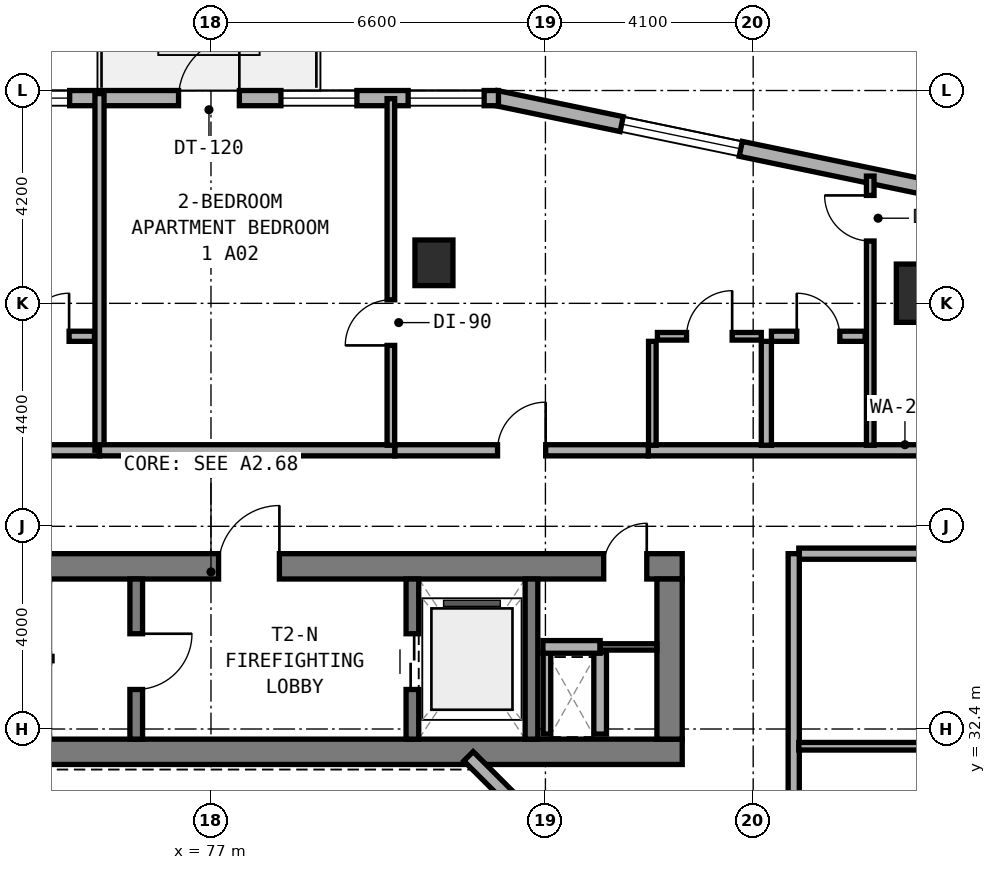
"""IFC4 building model, lengths in metres.
Left out: names, types, materials, properties, quantities, classifications, styles, units other than length and angle.
Written with IfcOpenShell. Run it as: python <this file> out.ifc"""

import sys

from ifc_helpers import new_model, si_unit, direction, frame, frame_2d, origin, origin_2d, place, context, subcontext, project, spatial, rectangle, extrude, element, fill, save


model = new_model("IFC4")
c1 = context("Model", 3, precision=1e-05, world=origin(), true_north=direction((0.0, 1.0)))
c2 = subcontext(c1, "Body", "Model", "MODEL_VIEW")
j1 = project(units=[si_unit("LENGTHUNIT", "METRE"), si_unit("PLANEANGLEUNIT", "RADIAN")], contexts=[c1])
p1 = place(None, origin())
s1 = spatial("IfcSite", under=j1, at=p1, CompositionType="ELEMENT")
p2 = place(p1, origin())
s2 = spatial("IfcBuilding", under=s1, at=p2, CompositionType="ELEMENT")
p3 = place(p2, frame((0.0, 0.0, 59.0)))
s3 = spatial("IfcBuildingStorey", under=s2, at=p3, CompositionType="ELEMENT", Elevation=59.0)
p4 = place(p3, frame((67.9, 31.95, 0.0), z_axis=(0.0, 0.0, 1.0), x_axis=(1.0, 0.0, 0.0)))
e1 = element("IfcWall", 1, at=p4, inside=s3, PredefinedType="SHEAR", context=c2, shape_type="SweptSolid", body=[
    extrude(rectangle(XDim=18.4, YDim=0.5, at=frame_2d((9.2, 0.0))), origin(), (0.0, 0.0, 1.0), 3.5),
])
p5 = place(p3, frame((67.9, 35.61, 0.0), z_axis=(0.0, 0.0, 1.0), x_axis=(1.0, 0.0, 0.0)))
e2 = element("IfcWall", 2, at=p5, inside=s3, PredefinedType="SHEAR", context=c2, shape_type="SweptSolid", body=[
    extrude(rectangle(XDim=18.4, YDim=0.5, at=frame_2d((9.2, 0.0))), origin(), (0.0, 0.0, 1.0), 3.5),
])
p6 = place(p5, frame((9.25, 0.0, 0.0)))
e3 = element("IfcOpeningElement", 3, at=p6, cuts=e2, PredefinedType="OPENING", context=c2, shape_type="SweptSolid", body=[
    extrude(rectangle(XDim=1.2, YDim=2.15, at=frame_2d((0.6, 1.075))), frame((0.0, 0.26, 0.0), z_axis=(0.0, -1.0, 0.0), x_axis=(1.0, 0.0, 0.0)), (0.0, 0.0, 1.0), 0.52),
])
p7 = place(p5, frame((16.85, 0.0, 0.0)))
e4 = element("IfcOpeningElement", 4, at=p7, cuts=e2, PredefinedType="OPENING", context=c2, shape_type="SweptSolid", body=[
    extrude(rectangle(XDim=0.85, YDim=2.1, at=frame_2d((0.425, 1.05))), frame((0.0, 0.26, 0.0), z_axis=(0.0, -1.0, 0.0), x_axis=(1.0, 0.0, 0.0)), (0.0, 0.0, 1.0), 0.52),
])
p8 = place(p3, frame((86.05, 32.2, 0.0), z_axis=(0.0, 0.0, 1.0), x_axis=(0.0, 1.0, 0.0)))
e5 = element("IfcWall", 5, at=p8, inside=s3, PredefinedType="SHEAR", context=c2, shape_type="SweptSolid", body=[
    extrude(rectangle(XDim=3.16, YDim=0.5, at=frame_2d((1.58, 0.0))), origin(), (0.0, 0.0, 1.0), 3.5),
])
p9 = place(p3, frame((75.525, 32.2, 0.0), z_axis=(0.0, 0.0, 1.0), x_axis=(0.0, 1.0, 0.0)))
e6 = element("IfcWall", 6, at=p9, inside=s3, PredefinedType="STANDARD", context=c2, shape_type="SweptSolid", body=[
    extrude(rectangle(XDim=3.16, YDim=0.25, at=frame_2d((1.58, 0.0))), origin(), (0.0, 0.0, 1.0), 3.25),
])
p10 = place(p9, frame((0.98, 0.0, 0.0)))
e7 = element("IfcOpeningElement", 7, at=p10, cuts=e6, PredefinedType="OPENING", context=c2, shape_type="SweptSolid", body=[
    extrude(rectangle(XDim=1.1, YDim=2.15, at=frame_2d((0.55, 1.075))), frame((0.0, 0.135, 0.0), z_axis=(0.0, -1.0, 0.0), x_axis=(1.0, 0.0, 0.0)), (0.0, 0.0, 1.0), 0.27),
])
p11 = place(p3, frame((80.975, 32.2, 0.0), z_axis=(0.0, 0.0, 1.0), x_axis=(0.0, 1.0, 0.0)))
e8 = element("IfcWall", 8, at=p11, inside=s3, PredefinedType="STANDARD", context=c2, shape_type="SweptSolid", body=[
    extrude(rectangle(XDim=3.16, YDim=0.25, at=frame_2d((1.58, 0.0))), origin(), (0.0, 0.0, 1.0), 3.25),
])
p12 = place(p11, frame((0.98, 0.0, 0.0)))
e9 = element("IfcOpeningElement", 9, at=p12, cuts=e8, PredefinedType="OPENING", context=c2, shape_type="SweptSolid", body=[
    extrude(rectangle(XDim=1.1, YDim=2.15, at=frame_2d((0.55, 1.075))), frame((0.0, 0.135, 0.0), z_axis=(0.0, -1.0, 0.0), x_axis=(1.0, 0.0, 0.0)), (0.0, 0.0, 1.0), 0.27),
])
p13 = place(p3, frame((83.325, 32.2, 0.0), z_axis=(0.0, 0.0, 1.0), x_axis=(0.0, 1.0, 0.0)))
e10 = element("IfcWall", 10, at=p13, inside=s3, PredefinedType="STANDARD", context=c2, shape_type="SweptSolid", body=[
    extrude(rectangle(XDim=3.16, YDim=0.25, at=frame_2d((1.58, 0.0))), origin(), (0.0, 0.0, 1.0), 3.25),
])
p14 = place(p3, frame((81.4, 41.6, 0.0), z_axis=(0.0, 0.0, 1.0), x_axis=(1.0, 0.0, 0.0)))
e11 = element("IfcColumn", 11, at=p14, inside=s3, PredefinedType="COLUMN", context=c2, shape_type="SweptSolid", body=[
    extrude(rectangle(XDim=0.75, YDim=0.9, at=origin_2d()), origin(), (0.0, 0.0, 1.0), 3.5),
])
p15 = place(p3, frame((91.0, 41.0, 0.0), z_axis=(0.0, 0.0, 1.0), x_axis=(1.0, 0.0, 0.0)))
e12 = element("IfcColumn", 12, at=p15, inside=s3, PredefinedType="COLUMN", context=c2, shape_type="SweptSolid", body=[
    extrude(rectangle(XDim=0.95, YDim=1.15, at=origin_2d()), origin(), (0.0, 0.0, 1.0), 3.5),
])
p16 = place(p3, frame((91.298, 43.051, 0.0), z_axis=(0.0, 0.0, 1.0), x_axis=(-0.979120793441, 0.203279295189, 0.0)))
e13 = element("IfcWall", 13, at=p16, inside=s3, PredefinedType="STANDARD", context=c2, shape_type="SweptSolid", body=[
    extrude(rectangle(XDim=8.855, YDim=0.3, at=frame_2d((4.427, 0.0))), origin(), (0.0, 0.0, 1.0), 3.25),
])
p17 = place(p16, frame((3.925, 0.0, 0.8)))
e14 = element("IfcOpeningElement", 14, at=p17, cuts=e13, PredefinedType="OPENING", context=c2, shape_type="SweptSolid", body=[
    extrude(rectangle(XDim=2.4, YDim=1.6, at=frame_2d((1.2, 0.8))), frame((0.0, 0.16, 0.0), z_axis=(0.0, -1.0, 0.0), x_axis=(1.0, 0.0, 0.0)), (0.0, 0.0, 1.0), 0.32),
])
p18 = place(p3, frame((82.673, 44.85, 0.0), z_axis=(0.0, 0.0, 1.0), x_axis=(-1.0, 0.0, 0.0)))
e15 = element("IfcWall", 15, at=p18, inside=s3, PredefinedType="STANDARD", context=c2, shape_type="SweptSolid", body=[
    extrude(rectangle(XDim=11.391, YDim=0.3, at=frame_2d((5.696, 0.0))), origin(), (0.0, 0.0, 1.0), 3.25),
])
p19 = place(p18, frame((5.113, 0.0, 0.0)))
e16 = element("IfcOpeningElement", 16, at=p19, cuts=e15, PredefinedType="OPENING", context=c2, shape_type="SweptSolid", body=[
    extrude(rectangle(XDim=1.2, YDim=2.15, at=frame_2d((0.6, 1.075))), frame((0.0, 0.16, 0.0), z_axis=(0.0, -1.0, 0.0), x_axis=(1.0, 0.0, 0.0)), (0.0, 0.0, 1.0), 0.32),
])
p20 = place(p18, frame((0.282, 0.0, 0.85)))
e17 = element("IfcOpeningElement", 17, at=p20, cuts=e15, PredefinedType="OPENING", context=c2, shape_type="SweptSolid", body=[
    extrude(rectangle(XDim=1.5, YDim=1.5, at=frame_2d((0.75, 0.75))), frame((0.0, 0.16, 0.0), z_axis=(0.0, -1.0, 0.0), x_axis=(1.0, 0.0, 0.0)), (0.0, 0.0, 1.0), 0.32),
])
p21 = place(p18, frame((2.793, 0.0, 0.85)))
e18 = element("IfcOpeningElement", 18, at=p21, cuts=e15, PredefinedType="OPENING", context=c2, shape_type="SweptSolid", body=[
    extrude(rectangle(XDim=1.5, YDim=1.5, at=frame_2d((0.75, 0.75))), frame((0.0, 0.16, 0.0), z_axis=(0.0, -1.0, 0.0), x_axis=(1.0, 0.0, 0.0)), (0.0, 0.0, 1.0), 0.32),
])
p22 = place(p18, frame((8.462, 0.0, 0.8)))
e19 = element("IfcOpeningElement", 19, at=p22, cuts=e15, PredefinedType="OPENING", context=c2, shape_type="SweptSolid", body=[
    extrude(rectangle(XDim=2.4, YDim=1.6, at=frame_2d((1.2, 0.8))), frame((0.0, 0.16, 0.0), z_axis=(0.0, -1.0, 0.0), x_axis=(1.0, 0.0, 0.0)), (0.0, 0.0, 1.0), 0.32),
])
p23 = place(p3, frame((83.716, 30.228, 0.0), z_axis=(0.0, 0.0, 1.0), x_axis=(-0.707106781187, 0.707106781187, 0.0)))
e20 = element("IfcWall", 20, at=p23, inside=s3, PredefinedType="STANDARD", context=c2, shape_type="SweptSolid", body=[
    extrude(rectangle(XDim=2.311, YDim=0.26, at=frame_2d((1.155, 0.0))), origin(), (0.0, 0.0, 1.0), 3.25),
])
p24 = place(p3, frame((83.63, 32.3, 0.0), z_axis=(0.0, 0.0, 1.0), x_axis=(0.0, 1.0, 0.0)))
e21 = element("IfcWall", 21, at=p24, inside=s3, PredefinedType="PARTITIONING", context=c2, shape_type="SweptSolid", body=[
    extrude(rectangle(XDim=1.62, YDim=0.15, at=frame_2d((0.81, 0.0))), origin(), (0.0, 0.0, 1.0), 2.725),
])
p25 = place(p3, frame((84.68, 32.3, 0.0), z_axis=(0.0, 0.0, 1.0), x_axis=(0.0, 1.0, 0.0)))
e22 = element("IfcWall", 22, at=p25, inside=s3, PredefinedType="SOLIDWALL", context=c2, shape_type="SweptSolid", body=[
    extrude(rectangle(XDim=1.62, YDim=0.25, at=frame_2d((0.81, 0.0))), origin(), (0.0, 0.0, 1.0), 3.22),
])
p26 = place(p3, frame((83.55, 34.02, 0.0), z_axis=(0.0, 0.0, 1.0), x_axis=(1.0, 0.0, 0.0)))
e23 = element("IfcWall", 23, at=p26, inside=s3, PredefinedType="SOLIDWALL", context=c2, shape_type="SweptSolid", body=[
    extrude(rectangle(XDim=1.13, YDim=0.25, at=frame_2d((0.565, 0.0))), origin(), (0.0, 0.0, 1.0), 3.22),
])
p27 = place(p3, frame((84.68, 34.02, 0.0), z_axis=(0.0, 0.0, 1.0), x_axis=(1.0, 0.0, 0.0)))
e24 = element("IfcWall", 24, at=p27, inside=s3, PredefinedType="PARTITIONING", context=c2, shape_type="SweptSolid", body=[
    extrude(rectangle(XDim=1.12, YDim=0.125, at=frame_2d((0.56, 0.0))), origin(), (0.0, 0.0, 1.0), 3.22),
])
p28 = place(p3, frame((70.42, 37.9, 0.0), z_axis=(0.0, 0.0, 1.0), x_axis=(1.0, 0.0, 0.0)))
e25 = element("IfcWall", 25, at=p28, inside=s3, PredefinedType="SOLIDWALL", context=c2, shape_type="SweptSolid", body=[
    extrude(rectangle(XDim=4.38, YDim=0.22, at=frame_2d((2.19, 0.0))), origin(), (0.0, 0.0, 1.0), 2.725),
])
p29 = place(p3, frame((72.85, 40.15, 0.0), z_axis=(0.0, 0.0, 1.0), x_axis=(1.0, 0.0, 0.0)))
e26 = element("IfcWall", 26, at=p29, inside=s3, PredefinedType="PLUMBINGWALL", context=c2, shape_type="SweptSolid", body=[
    extrude(rectangle(XDim=1.85, YDim=0.2, at=frame_2d((0.925, 0.0))), origin(), (0.0, 0.0, 1.0), 3.22),
])
p30 = place(p29, frame((0.5, 0.0, 0.0)))
e27 = element("IfcOpeningElement", 27, at=p30, cuts=e26, PredefinedType="OPENING", context=c2, shape_type="SweptSolid", body=[
    extrude(rectangle(XDim=0.85, YDim=2.1, at=frame_2d((0.425, 1.05))), frame((0.0, 0.11, 0.0), z_axis=(0.0, -1.0, 0.0), x_axis=(1.0, 0.0, 0.0)), (0.0, 0.0, 1.0), 0.22),
])
p31 = place(p3, frame((74.8, 37.9, 0.0), z_axis=(0.0, 0.0, 1.0), x_axis=(0.0, 1.0, 0.0)))
e28 = element("IfcWall", 28, at=p31, inside=s3, PredefinedType="SOLIDWALL", context=c2, shape_type="SweptSolid", body=[
    extrude(rectangle(XDim=7.04, YDim=0.18, at=frame_2d((3.52, 0.0))), origin(), (0.0, 0.0, 1.0), 2.865),
])
p32 = place(p3, frame((74.8, 37.9, 0.0), z_axis=(0.0, 0.0, 1.0), x_axis=(1.0, 0.0, 0.0)))
e29 = element("IfcWall", 29, at=p32, inside=s3, PredefinedType="SOLIDWALL", context=c2, shape_type="SweptSolid", body=[
    extrude(rectangle(XDim=5.83, YDim=0.22, at=frame_2d((2.915, 0.0))), origin(), (0.0, 0.0, 1.0), 3.22),
])
p33 = place(p3, frame((85.63, 37.9, 0.0), z_axis=(0.0, 0.0, 1.0), x_axis=(1.0, 0.0, 0.0)))
e30 = element("IfcWall", 30, at=p33, inside=s3, PredefinedType="SOLIDWALL", context=c2, shape_type="SweptSolid", body=[
    extrude(rectangle(XDim=10.13, YDim=0.22, at=frame_2d((5.065, 0.0))), origin(), (0.0, 0.0, 1.0), 2.865),
])
p34 = place(p3, frame((80.63, 37.9, 0.0), z_axis=(0.0, 0.0, 1.0), x_axis=(1.0, 0.0, 0.0)))
e31 = element("IfcWall", 31, at=p34, inside=s3, PredefinedType="SOLIDWALL", context=c2, shape_type="SweptSolid", body=[
    extrude(rectangle(XDim=5.0, YDim=0.22, at=frame_2d((2.5, 0.0))), origin(), (0.0, 0.0, 1.0), 2.725),
])
p35 = place(p34, frame((2.025, 0.0, 0.0)))
e32 = element("IfcOpeningElement", 32, at=p35, cuts=e31, PredefinedType="OPENING", context=c2, shape_type="SweptSolid", body=[
    extrude(rectangle(XDim=0.95, YDim=2.1, at=frame_2d((0.475, 1.05))), frame((0.0, 0.12, 0.0), z_axis=(0.0, -1.0, 0.0), x_axis=(1.0, 0.0, 0.0)), (0.0, 0.0, 1.0), 0.24),
])
p36 = place(p3, frame((80.55, 38.0, 0.0), z_axis=(0.0, 0.0, 1.0), x_axis=(0.0, 1.0, 0.0)))
e33 = element("IfcWall", 33, at=p36, inside=s3, PredefinedType="PARTITIONING", context=c2, shape_type="SweptSolid", body=[
    extrude(rectangle(XDim=6.84, YDim=0.15, at=frame_2d((3.42, 0.0))), origin(), (0.0, 0.0, 1.0), 2.865),
])
p37 = place(p36, frame((1.97, 0.0, 0.0)))
e34 = element("IfcOpeningElement", 34, at=p37, cuts=e33, PredefinedType="OPENING", context=c2, shape_type="SweptSolid", body=[
    extrude(rectangle(XDim=0.9, YDim=2.1, at=frame_2d((0.45, 1.05))), frame((0.0, 0.085, 0.0), z_axis=(0.0, -1.0, 0.0), x_axis=(1.0, 0.0, 0.0)), (0.0, 0.0, 1.0), 0.17),
])
p38 = place(p3, frame((90.01, 38.0, 0.0), z_axis=(0.0, 0.0, 1.0), x_axis=(0.0, 1.0, 0.0)))
e35 = element("IfcWall", 35, at=p38, inside=s3, PredefinedType="PARTITIONING", context=c2, shape_type="SweptSolid", body=[
    extrude(rectangle(XDim=5.311, YDim=0.15, at=frame_2d((2.656, 0.0))), origin(), (0.0, 0.0, 1.0), 2.865),
])
p39 = place(p38, frame((4.03, 0.0, 0.0)))
e36 = element("IfcOpeningElement", 36, at=p39, cuts=e35, PredefinedType="OPENING", context=c2, shape_type="SweptSolid", body=[
    extrude(rectangle(XDim=0.9, YDim=2.1, at=frame_2d((0.45, 1.05))), frame((0.0, 0.085, 0.0), z_axis=(0.0, -1.0, 0.0), x_axis=(1.0, 0.0, 0.0)), (0.0, 0.0, 1.0), 0.17),
])
p40 = place(p3, frame((87.96, 38.0, 0.0), z_axis=(0.0, 0.0, 1.0), x_axis=(0.0, 1.0, 0.0)))
e37 = element("IfcWall", 37, at=p40, inside=s3, PredefinedType="PLUMBINGWALL", context=c2, shape_type="SweptSolid", body=[
    extrude(rectangle(XDim=2.05, YDim=0.2, at=frame_2d((1.025, 0.0))), origin(), (0.0, 0.0, 1.0), 3.22),
])
p41 = place(p3, frame((85.71, 38.0, 0.0), z_axis=(0.0, 0.0, 1.0), x_axis=(0.0, 1.0, 0.0)))
e38 = element("IfcWall", 38, at=p41, inside=s3, PredefinedType="PARTITIONING", context=c2, shape_type="SweptSolid", body=[
    extrude(rectangle(XDim=2.05, YDim=0.15, at=frame_2d((1.025, 0.0))), origin(), (0.0, 0.0, 1.0), 3.22),
])
p42 = place(p3, frame((88.06, 40.15, 0.0), z_axis=(0.0, 0.0, 1.0), x_axis=(1.0, 0.0, 0.0)))
e39 = element("IfcWall", 39, at=p42, inside=s3, PredefinedType="PLUMBINGWALL", context=c2, shape_type="SweptSolid", body=[
    extrude(rectangle(XDim=1.85, YDim=0.2, at=frame_2d((0.925, 0.0))), origin(), (0.0, 0.0, 1.0), 3.22),
])
p43 = place(p42, frame((0.5, 0.0, 0.0)))
e40 = element("IfcOpeningElement", 40, at=p43, cuts=e39, PredefinedType="OPENING", context=c2, shape_type="SweptSolid", body=[
    extrude(rectangle(XDim=0.85, YDim=2.1, at=frame_2d((0.425, 1.05))), frame((0.0, 0.11, 0.0), z_axis=(0.0, -1.0, 0.0), x_axis=(1.0, 0.0, 0.0)), (0.0, 0.0, 1.0), 0.22),
])
p44 = place(p3, frame((85.81, 40.15, 0.0), z_axis=(0.0, 0.0, 1.0), x_axis=(1.0, 0.0, 0.0)))
e41 = element("IfcWall", 41, at=p44, inside=s3, PredefinedType="PARTITIONING", context=c2, shape_type="SweptSolid", body=[
    extrude(rectangle(XDim=2.05, YDim=0.15, at=frame_2d((1.025, 0.0))), origin(), (0.0, 0.0, 1.0), 3.22),
])
p45 = place(p44, frame((0.575, 0.0, 0.0)))
e42 = element("IfcOpeningElement", 42, at=p45, cuts=e41, PredefinedType="OPENING", context=c2, shape_type="SweptSolid", body=[
    extrude(rectangle(XDim=0.9, YDim=2.1, at=frame_2d((0.45, 1.05))), frame((0.0, 0.085, 0.0), z_axis=(0.0, -1.0, 0.0), x_axis=(1.0, 0.0, 0.0)), (0.0, 0.0, 1.0), 0.17),
])
p46 = place(p3, frame((88.6, 35.86, 0.0), z_axis=(0.0, 0.0, 1.0), x_axis=(1.0, 0.0, 0.0)))
e43 = element("IfcWall", 43, at=p46, inside=s3, PredefinedType="SOLIDWALL", context=c2, shape_type="SweptSolid", body=[
    extrude(rectangle(XDim=7.0, YDim=0.22, at=frame_2d((3.5, 0.0))), origin(), (0.0, 0.0, 1.0), 2.865),
])
p47 = place(p3, frame((88.5, 26.4, 0.0), z_axis=(0.0, 0.0, 1.0), x_axis=(0.0, 1.0, 0.0)))
e44 = element("IfcWall", 44, at=p47, inside=s3, PredefinedType="SOLIDWALL", context=c2, shape_type="SweptSolid", body=[
    extrude(rectangle(XDim=9.46, YDim=0.22, at=frame_2d((4.73, 0.0))), origin(), (0.0, 0.0, 1.0), 2.725),
])
p48 = place(p47, frame((2.355, 0.0, 0.0)))
e45 = element("IfcOpeningElement", 45, at=p48, cuts=e44, PredefinedType="OPENING", context=c2, shape_type="SweptSolid", body=[
    extrude(rectangle(XDim=0.95, YDim=2.1, at=frame_2d((0.475, 1.05))), frame((0.0, 0.12, 0.0), z_axis=(0.0, -1.0, 0.0), x_axis=(1.0, 0.0, 0.0)), (0.0, 0.0, 1.0), 0.24),
])
p49 = place(p3, frame((88.6, 32.06, 0.0), z_axis=(0.0, 0.0, 1.0), x_axis=(1.0, 0.0, 0.0)))
e46 = element("IfcWall", 46, at=p49, inside=s3, PredefinedType="PARTITIONING", context=c2, shape_type="SweptSolid", body=[
    extrude(rectangle(XDim=7.06, YDim=0.15, at=frame_2d((3.53, 0.0))), origin(), (0.0, 0.0, 1.0), 2.865),
])
p50 = place(p49, frame((2.45, 0.0, 0.0)))
e47 = element("IfcOpeningElement", 47, at=p50, cuts=e46, PredefinedType="OPENING", context=c2, shape_type="SweptSolid", body=[
    extrude(rectangle(XDim=0.9, YDim=2.1, at=frame_2d((0.45, 1.05))), frame((0.0, 0.085, 0.0), z_axis=(0.0, -1.0, 0.0), x_axis=(1.0, 0.0, 0.0)), (0.0, 0.0, 1.0), 0.17),
])
p51 = place(p17, origin())
e48 = element("IfcWindow", 48, at=p51, inside=s3, PartitioningType="SINGLE_PANEL", PredefinedType="WINDOW", context=c2, shape_type="SweptSolid", body=[
    extrude(rectangle(XDim=2.4, YDim=1.6, at=frame_2d((1.2, 0.8))), frame((0.0, 0.03, 0.0), z_axis=(0.0, -1.0, 0.0), x_axis=(1.0, 0.0, 0.0)), (0.0, 0.0, 1.0), 0.06),
])
fill(e14, e48)
p52 = place(p19, frame((1.2, 0.0, 0.0), z_axis=(0.0, 0.0, 1.0), x_axis=(-1.0, 0.0, 0.0)))
e49 = element("IfcDoor", 49, at=p52, inside=s3, OperationType="SINGLE_SWING_RIGHT", PredefinedType="DOOR", context=c2, shape_type="SweptSolid", body=[
    extrude(rectangle(XDim=1.2, YDim=2.15, at=frame_2d((0.6, 1.075))), frame((0.0, 0.025, 0.0), z_axis=(0.0, -1.0, 0.0), x_axis=(1.0, 0.0, 0.0)), (0.0, 0.0, 1.0), 0.05),
])
fill(e16, e49)
p53 = place(p20, origin())
e50 = element("IfcWindow", 50, at=p53, inside=s3, PartitioningType="SINGLE_PANEL", PredefinedType="WINDOW", context=c2, shape_type="SweptSolid", body=[
    extrude(rectangle(XDim=1.5, YDim=1.5, at=frame_2d((0.75, 0.75))), frame((0.0, 0.03, 0.0), z_axis=(0.0, -1.0, 0.0), x_axis=(1.0, 0.0, 0.0)), (0.0, 0.0, 1.0), 0.06),
])
fill(e17, e50)
p54 = place(p21, origin())
e51 = element("IfcWindow", 51, at=p54, inside=s3, PartitioningType="SINGLE_PANEL", PredefinedType="WINDOW", context=c2, shape_type="SweptSolid", body=[
    extrude(rectangle(XDim=1.5, YDim=1.5, at=frame_2d((0.75, 0.75))), frame((0.0, 0.03, 0.0), z_axis=(0.0, -1.0, 0.0), x_axis=(1.0, 0.0, 0.0)), (0.0, 0.0, 1.0), 0.06),
])
fill(e18, e51)
p55 = place(p22, origin())
e52 = element("IfcWindow", 52, at=p55, inside=s3, PartitioningType="SINGLE_PANEL", PredefinedType="WINDOW", context=c2, shape_type="SweptSolid", body=[
    extrude(rectangle(XDim=2.4, YDim=1.6, at=frame_2d((1.2, 0.8))), frame((0.0, 0.03, 0.0), z_axis=(0.0, -1.0, 0.0), x_axis=(1.0, 0.0, 0.0)), (0.0, 0.0, 1.0), 0.06),
])
fill(e19, e52)
p56 = place(p10, frame((1.1, 0.0, 0.0), z_axis=(0.0, 0.0, 1.0), x_axis=(-1.0, 0.0, 0.0)))
e53 = element("IfcDoor", 53, at=p56, inside=s3, OperationType="SINGLE_SWING_LEFT", PredefinedType="DOOR", context=c2, shape_type="SweptSolid", body=[
    extrude(rectangle(XDim=1.1, YDim=2.15, at=frame_2d((0.55, 1.075))), frame((0.0, 0.025, 0.0), z_axis=(0.0, -1.0, 0.0), x_axis=(1.0, 0.0, 0.0)), (0.0, 0.0, 1.0), 0.05),
])
fill(e7, e53)
p57 = place(p6, origin())
e54 = element("IfcDoor", 54, at=p57, inside=s3, OperationType="SINGLE_SWING_RIGHT", PredefinedType="DOOR", context=c2, shape_type="SweptSolid", body=[
    extrude(rectangle(XDim=1.2, YDim=2.15, at=frame_2d((0.6, 1.075))), frame((0.0, 0.025, 0.0), z_axis=(0.0, -1.0, 0.0), x_axis=(1.0, 0.0, 0.0)), (0.0, 0.0, 1.0), 0.05),
])
fill(e3, e54)
p58 = place(p12, origin())
e55 = element("IfcDoor", 55, at=p58, inside=s3, OperationType="DOUBLE_DOOR_SLIDING", PredefinedType="DOOR", context=c2, shape_type="SweptSolid", body=[
    extrude(rectangle(XDim=1.1, YDim=2.15, at=frame_2d((0.55, 1.075))), frame((0.0, 0.025, 0.0), z_axis=(0.0, -1.0, 0.0), x_axis=(1.0, 0.0, 0.0)), (0.0, 0.0, 1.0), 0.05),
])
fill(e9, e55)
p59 = place(p7, origin())
e56 = element("IfcDoor", 56, at=p59, inside=s3, OperationType="SINGLE_SWING_RIGHT", PredefinedType="DOOR", context=c2, shape_type="SweptSolid", body=[
    extrude(rectangle(XDim=0.85, YDim=2.1, at=frame_2d((0.425, 1.05))), frame((0.0, 0.025, 0.0), z_axis=(0.0, -1.0, 0.0), x_axis=(1.0, 0.0, 0.0)), (0.0, 0.0, 1.0), 0.05),
])
fill(e4, e56)
p60 = place(p30, origin())
e57 = element("IfcDoor", 57, at=p60, inside=s3, OperationType="SINGLE_SWING_RIGHT", PredefinedType="DOOR", context=c2, shape_type="SweptSolid", body=[
    extrude(rectangle(XDim=0.85, YDim=2.1, at=frame_2d((0.425, 1.05))), frame((0.0, 0.025, 0.0), z_axis=(0.0, -1.0, 0.0), x_axis=(1.0, 0.0, 0.0)), (0.0, 0.0, 1.0), 0.05),
])
fill(e27, e57)
p61 = place(p35, origin())
e58 = element("IfcDoor", 58, at=p61, inside=s3, OperationType="SINGLE_SWING_RIGHT", PredefinedType="DOOR", context=c2, shape_type="SweptSolid", body=[
    extrude(rectangle(XDim=0.95, YDim=2.1, at=frame_2d((0.475, 1.05))), frame((0.0, 0.025, 0.0), z_axis=(0.0, -1.0, 0.0), x_axis=(1.0, 0.0, 0.0)), (0.0, 0.0, 1.0), 0.05),
])
fill(e32, e58)
p62 = place(p37, origin())
e59 = element("IfcDoor", 59, at=p62, inside=s3, OperationType="SINGLE_SWING_LEFT", PredefinedType="DOOR", context=c2, shape_type="SweptSolid", body=[
    extrude(rectangle(XDim=0.9, YDim=2.1, at=frame_2d((0.45, 1.05))), frame((0.0, 0.025, 0.0), z_axis=(0.0, -1.0, 0.0), x_axis=(1.0, 0.0, 0.0)), (0.0, 0.0, 1.0), 0.05),
])
fill(e34, e59)
p63 = place(p39, origin())
e60 = element("IfcDoor", 60, at=p63, inside=s3, OperationType="SINGLE_SWING_RIGHT", PredefinedType="DOOR", context=c2, shape_type="SweptSolid", body=[
    extrude(rectangle(XDim=0.9, YDim=2.1, at=frame_2d((0.45, 1.05))), frame((0.0, 0.025, 0.0), z_axis=(0.0, -1.0, 0.0), x_axis=(1.0, 0.0, 0.0)), (0.0, 0.0, 1.0), 0.05),
])
fill(e36, e60)
p64 = place(p43, origin())
e61 = element("IfcDoor", 61, at=p64, inside=s3, OperationType="SINGLE_SWING_LEFT", PredefinedType="DOOR", context=c2, shape_type="SweptSolid", body=[
    extrude(rectangle(XDim=0.85, YDim=2.1, at=frame_2d((0.425, 1.05))), frame((0.0, 0.025, 0.0), z_axis=(0.0, -1.0, 0.0), x_axis=(1.0, 0.0, 0.0)), (0.0, 0.0, 1.0), 0.05),
])
fill(e40, e61)
p65 = place(p45, origin())
e62 = element("IfcDoor", 62, at=p65, inside=s3, OperationType="SINGLE_SWING_RIGHT", PredefinedType="DOOR", context=c2, shape_type="SweptSolid", body=[
    extrude(rectangle(XDim=0.9, YDim=2.1, at=frame_2d((0.45, 1.05))), frame((0.0, 0.025, 0.0), z_axis=(0.0, -1.0, 0.0), x_axis=(1.0, 0.0, 0.0)), (0.0, 0.0, 1.0), 0.05),
])
fill(e42, e62)
save(model, sys.argv[1])
